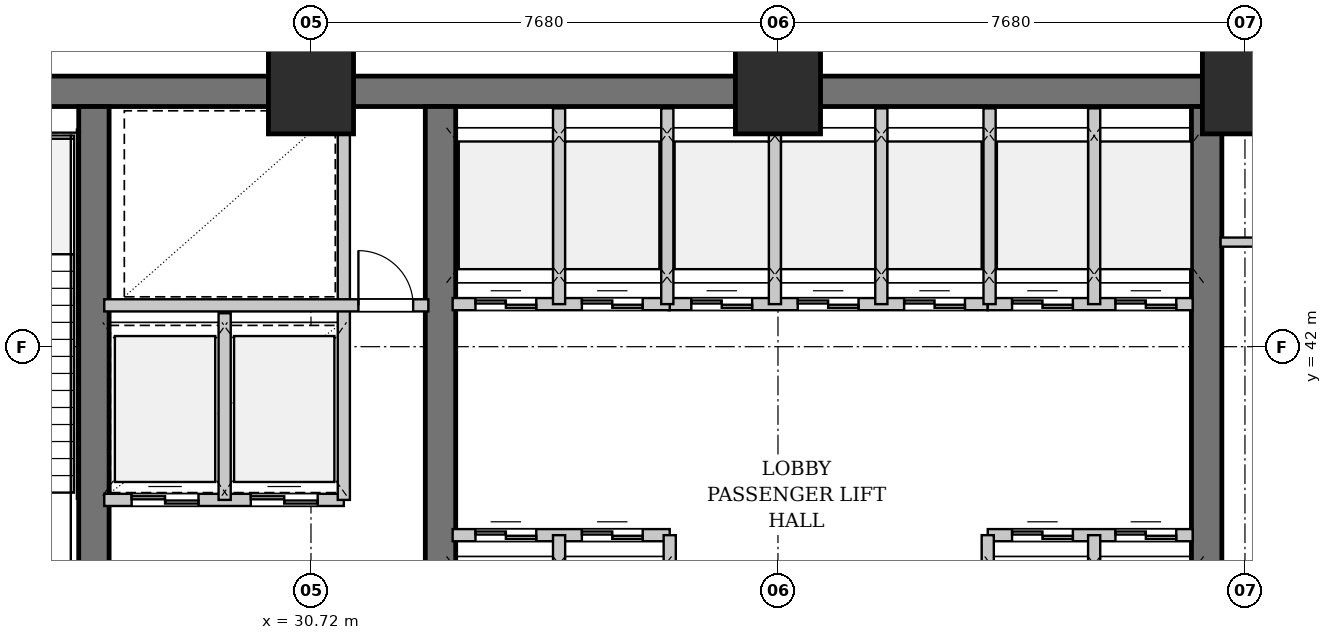
"""IFC4 building model, lengths in metres.
Left out: names, types, materials, properties, quantities, classifications, styles, units other than length and angle.
Written with IfcOpenShell. Run it as: python <this file> out.ifc"""

import sys

from ifc_helpers import new_model, si_unit, direction, frame, frame_2d, origin, origin_2d, place, context, subcontext, project, spatial, rectangle, extrude, element, fill, save


model = new_model("IFC4")
c1 = context("Model", 3, precision=1e-05, world=origin(), true_north=direction((0.0, 1.0)))
c2 = subcontext(c1, "Body", "Model", "MODEL_VIEW")
j1 = project(units=[si_unit("LENGTHUNIT", "METRE"), si_unit("PLANEANGLEUNIT", "RADIAN")], contexts=[c1])
p1 = place(None, origin())
s1 = spatial("IfcSite", under=j1, at=p1, CompositionType="ELEMENT")
p2 = place(p1, origin())
s2 = spatial("IfcBuilding", under=s1, at=p2, CompositionType="ELEMENT")
p3 = place(p2, origin())
s3 = spatial("IfcBuildingStorey", under=s2, at=p3, CompositionType="ELEMENT", Elevation=0.0)
p4 = place(p3, frame((22.79, 46.2, 0.0), z_axis=(0.0, 0.0, 1.0), x_axis=(1.0, 0.0, 0.0)))
e1 = element("IfcWall", 1, at=p4, inside=s3, PredefinedType="SHEAR", context=c2, shape_type="SweptSolid", body=[
    extrude(rectangle(XDim=31.22, YDim=0.5, at=frame_2d((15.61, 0.0))), origin(), (0.0, 0.0, 1.0), 4.94),
])
p5 = place(p3, frame((27.15, 35.65, 0.0), z_axis=(0.0, 0.0, 1.0), x_axis=(0.0, 1.0, 0.0)))
e2 = element("IfcWall", 2, at=p5, inside=s3, PredefinedType="SHEAR", context=c2, shape_type="SweptSolid", body=[
    extrude(rectangle(XDim=10.3, YDim=0.5, at=frame_2d((5.15, 0.0))), origin(), (0.0, 0.0, 1.0), 4.94),
])
p6 = place(p5, frame((0.65, 0.0, 0.0)))
e3 = element("IfcOpeningElement", 3, at=p6, cuts=e2, PredefinedType="OPENING", context=c2, shape_type="SweptSolid", body=[
    extrude(rectangle(XDim=1.1, YDim=2.15, at=frame_2d((0.55, 1.075))), frame((0.0, 0.26, 0.0), z_axis=(0.0, -1.0, 0.0), x_axis=(1.0, 0.0, 0.0)), (0.0, 0.0, 1.0), 0.52),
])
for number, where, z_axis, x_axis in (
    (4, (32.85, 35.65, 0.0), (0.0, 0.0, 1.0), (0.0, 1.0, 0.0)),
    (5, (45.45, 35.65, 0.0), (0.0, 0.0, 1.0), (0.0, 1.0, 0.0)),
):
    element("IfcWall", number, at=place(p3, frame(where, z_axis=z_axis, x_axis=x_axis)), inside=s3, PredefinedType="SHEAR", context=c2, shape_type="SweptSolid", body=[
        extrude(rectangle(XDim=10.3, YDim=0.5, at=frame_2d((5.15, 0.0))), origin(), (0.0, 0.0, 1.0), 4.94),
    ])
for number, where, z_axis, x_axis in (
    (6, (30.72, 46.2, 0.0), (0.0, 0.0, 1.0), (1.0, 0.0, 0.0)),
    (7, (38.4, 46.2, 0.0), (0.0, 0.0, 1.0), (1.0, 0.0, 0.0)),
    (8, (46.08, 46.2, 0.0), (0.0, 0.0, 1.0), (1.0, 0.0, 0.0)),
):
    element("IfcColumn", number, at=place(p3, frame(where, z_axis=z_axis, x_axis=x_axis)), inside=s3, PredefinedType="COLUMN", context=c2, shape_type="SweptSolid", body=[
        extrude(rectangle(XDim=1.4, YDim=1.4, at=origin_2d()), origin(), (0.0, 0.0, 1.0), 5.2),
    ])
p7 = place(p3, frame((27.32, 39.48, 0.0), z_axis=(0.0, 0.0, 1.0), x_axis=(1.0, 0.0, 0.0)))
e9 = element("IfcWall", 9, at=p7, inside=s3, PredefinedType="PARTITIONING", context=c2, shape_type="SweptSolid", body=[
    extrude(rectangle(XDim=3.94, YDim=0.2, at=frame_2d((1.97, 0.0))), origin(), (0.0, 0.0, 1.0), 4.94),
])
p8 = place(p7, frame((0.45, 0.0, 0.0)))
e10 = element("IfcOpeningElement", 10, at=p8, cuts=e9, PredefinedType="OPENING", context=c2, shape_type="SweptSolid", body=[
    extrude(rectangle(XDim=1.1, YDim=2.2, at=frame_2d((0.55, 1.1))), frame((0.0, 0.11, 0.0), z_axis=(0.0, -1.0, 0.0), x_axis=(1.0, 0.0, 0.0)), (0.0, 0.0, 1.0), 0.22),
])
p9 = place(p7, frame((2.41, 0.0, 0.0)))
e11 = element("IfcOpeningElement", 11, at=p9, cuts=e9, PredefinedType="OPENING", context=c2, shape_type="SweptSolid", body=[
    extrude(rectangle(XDim=1.1, YDim=2.2, at=frame_2d((0.55, 1.1))), frame((0.0, 0.11, 0.0), z_axis=(0.0, -1.0, 0.0), x_axis=(1.0, 0.0, 0.0)), (0.0, 0.0, 1.0), 0.22),
])
p10 = place(p3, frame((29.3, 39.48, 0.0), z_axis=(0.0, 0.0, 1.0), x_axis=(0.0, 1.0, 0.0)))
e12 = element("IfcWall", 12, at=p10, inside=s3, PredefinedType="PARTITIONING", context=c2, shape_type="SweptSolid", body=[
    extrude(rectangle(XDim=3.07, YDim=0.2, at=frame_2d((1.535, 0.0))), origin(), (0.0, 0.0, 1.0), 4.94),
])
p11 = place(p3, frame((31.26, 39.48, 0.0), z_axis=(0.0, 0.0, 1.0), x_axis=(0.0, 1.0, 0.0)))
e13 = element("IfcWall", 13, at=p11, inside=s3, PredefinedType="PARTITIONING", context=c2, shape_type="SweptSolid", body=[
    extrude(rectangle(XDim=6.44, YDim=0.2, at=frame_2d((3.22, 0.0))), origin(), (0.0, 0.0, 1.0), 4.94),
])
p12 = place(p3, frame((27.32, 42.68, 0.0), z_axis=(0.0, 0.0, 1.0), x_axis=(1.0, 0.0, 0.0)))
e14 = element("IfcWall", 14, at=p12, inside=s3, PredefinedType="PARTITIONING", context=c2, shape_type="SweptSolid", body=[
    extrude(rectangle(XDim=5.33, YDim=0.2, at=frame_2d((2.665, 0.0))), origin(), (0.0, 0.0, 1.0), 4.94),
])
p13 = place(p12, frame((4.18, 0.0, 0.0)))
e15 = element("IfcOpeningElement", 15, at=p13, cuts=e14, PredefinedType="OPENING", context=c2, shape_type="SweptSolid", body=[
    extrude(rectangle(XDim=0.9, YDim=2.15, at=frame_2d((0.45, 1.075))), frame((0.0, 0.11, 0.0), z_axis=(0.0, -1.0, 0.0), x_axis=(1.0, 0.0, 0.0)), (0.0, 0.0, 1.0), 0.22),
])
p14 = place(p3, frame((36.6, 42.7, 0.0), z_axis=(0.0, 0.0, 1.0), x_axis=(1.0, 0.0, 0.0)))
e16 = element("IfcWall", 16, at=p14, inside=s3, PredefinedType="PARTITIONING", context=c2, shape_type="SweptSolid", body=[
    extrude(rectangle(XDim=5.25, YDim=0.2, at=frame_2d((2.625, 0.0))), origin(), (0.0, 0.0, 1.0), 4.94),
])
p15 = place(p14, frame((0.375, 0.0, 0.0)))
e17 = element("IfcOpeningElement", 17, at=p15, cuts=e16, PredefinedType="OPENING", context=c2, shape_type="SweptSolid", body=[
    extrude(rectangle(XDim=1.0, YDim=2.2, at=frame_2d((0.5, 1.1))), frame((0.0, 0.11, 0.0), z_axis=(0.0, -1.0, 0.0), x_axis=(1.0, 0.0, 0.0)), (0.0, 0.0, 1.0), 0.22),
])
p16 = place(p14, frame((2.125, 0.0, 0.0)))
e18 = element("IfcOpeningElement", 18, at=p16, cuts=e16, PredefinedType="OPENING", context=c2, shape_type="SweptSolid", body=[
    extrude(rectangle(XDim=1.0, YDim=2.2, at=frame_2d((0.5, 1.1))), frame((0.0, 0.11, 0.0), z_axis=(0.0, -1.0, 0.0), x_axis=(1.0, 0.0, 0.0)), (0.0, 0.0, 1.0), 0.22),
])
p17 = place(p14, frame((3.875, 0.0, 0.0)))
e19 = element("IfcOpeningElement", 19, at=p17, cuts=e16, PredefinedType="OPENING", context=c2, shape_type="SweptSolid", body=[
    extrude(rectangle(XDim=1.0, YDim=2.2, at=frame_2d((0.5, 1.1))), frame((0.0, 0.11, 0.0), z_axis=(0.0, -1.0, 0.0), x_axis=(1.0, 0.0, 0.0)), (0.0, 0.0, 1.0), 0.22),
])
p18 = place(p3, frame((38.35, 42.7, 0.0), z_axis=(0.0, 0.0, 1.0), x_axis=(0.0, 1.0, 0.0)))
e20 = element("IfcWall", 20, at=p18, inside=s3, PredefinedType="PARTITIONING", context=c2, shape_type="SweptSolid", body=[
    extrude(rectangle(XDim=3.22, YDim=0.2, at=frame_2d((1.61, 0.0))), origin(), (0.0, 0.0, 1.0), 3.935),
])
p19 = place(p3, frame((40.1, 42.7, 0.0), z_axis=(0.0, 0.0, 1.0), x_axis=(0.0, 1.0, 0.0)))
e21 = element("IfcWall", 21, at=p19, inside=s3, PredefinedType="PARTITIONING", context=c2, shape_type="SweptSolid", body=[
    extrude(rectangle(XDim=3.22, YDim=0.2, at=frame_2d((1.61, 0.0))), origin(), (0.0, 0.0, 1.0), 4.94),
])
p20 = place(p3, frame((33.05, 38.9, 0.0), z_axis=(0.0, 0.0, 1.0), x_axis=(1.0, 0.0, 0.0)))
e22 = element("IfcWall", 22, at=p20, inside=s3, PredefinedType="PARTITIONING", context=c2, shape_type="SweptSolid", body=[
    extrude(rectangle(XDim=3.57, YDim=0.2, at=frame_2d((1.785, 0.0))), origin(), (0.0, 0.0, 1.0), 4.94),
])
p21 = place(p20, frame((0.375, 0.0, 0.0)))
e23 = element("IfcOpeningElement", 23, at=p21, cuts=e22, PredefinedType="OPENING", context=c2, shape_type="SweptSolid", body=[
    extrude(rectangle(XDim=1.0, YDim=2.2, at=frame_2d((0.5, 1.1))), frame((0.0, 0.11, 0.0), z_axis=(0.0, -1.0, 0.0), x_axis=(1.0, 0.0, 0.0)), (0.0, 0.0, 1.0), 0.22),
])
p22 = place(p20, frame((2.125, 0.0, 0.0)))
e24 = element("IfcOpeningElement", 24, at=p22, cuts=e22, PredefinedType="OPENING", context=c2, shape_type="SweptSolid", body=[
    extrude(rectangle(XDim=1.0, YDim=2.2, at=frame_2d((0.5, 1.1))), frame((0.0, 0.11, 0.0), z_axis=(0.0, -1.0, 0.0), x_axis=(1.0, 0.0, 0.0)), (0.0, 0.0, 1.0), 0.22),
])
p23 = place(p3, frame((33.05, 42.7, 0.0), z_axis=(0.0, 0.0, 1.0), x_axis=(1.0, 0.0, 0.0)))
e25 = element("IfcWall", 25, at=p23, inside=s3, PredefinedType="PARTITIONING", context=c2, shape_type="SweptSolid", body=[
    extrude(rectangle(XDim=3.57, YDim=0.2, at=frame_2d((1.785, 0.0))), origin(), (0.0, 0.0, 1.0), 4.94),
])
p24 = place(p23, frame((0.375, 0.0, 0.0)))
e26 = element("IfcOpeningElement", 26, at=p24, cuts=e25, PredefinedType="OPENING", context=c2, shape_type="SweptSolid", body=[
    extrude(rectangle(XDim=1.0, YDim=2.2, at=frame_2d((0.5, 1.1))), frame((0.0, 0.11, 0.0), z_axis=(0.0, -1.0, 0.0), x_axis=(1.0, 0.0, 0.0)), (0.0, 0.0, 1.0), 0.22),
])
p25 = place(p23, frame((2.125, 0.0, 0.0)))
e27 = element("IfcOpeningElement", 27, at=p25, cuts=e25, PredefinedType="OPENING", context=c2, shape_type="SweptSolid", body=[
    extrude(rectangle(XDim=1.0, YDim=2.2, at=frame_2d((0.5, 1.1))), frame((0.0, 0.11, 0.0), z_axis=(0.0, -1.0, 0.0), x_axis=(1.0, 0.0, 0.0)), (0.0, 0.0, 1.0), 0.22),
])
p26 = place(p3, frame((34.8, 35.65, 0.0), z_axis=(0.0, 0.0, 1.0), x_axis=(0.0, 1.0, 0.0)))
e28 = element("IfcWall", 28, at=p26, inside=s3, PredefinedType="PARTITIONING", context=c2, shape_type="SweptSolid", body=[
    extrude(rectangle(XDim=3.25, YDim=0.2, at=frame_2d((1.625, 0.0))), origin(), (0.0, 0.0, 1.0), 4.94),
])
p27 = place(p3, frame((34.8, 42.7, 0.0), z_axis=(0.0, 0.0, 1.0), x_axis=(0.0, 1.0, 0.0)))
e29 = element("IfcWall", 29, at=p27, inside=s3, PredefinedType="PARTITIONING", context=c2, shape_type="SweptSolid", body=[
    extrude(rectangle(XDim=3.22, YDim=0.2, at=frame_2d((1.61, 0.0))), origin(), (0.0, 0.0, 1.0), 4.94),
])
p28 = place(p3, frame((36.62, 35.5, 0.0), z_axis=(0.0, 0.0, 1.0), x_axis=(0.0, 1.0, 0.0)))
e30 = element("IfcWall", 30, at=p28, inside=s3, PredefinedType="PARTITIONING", context=c2, shape_type="SweptSolid", body=[
    extrude(rectangle(XDim=3.4, YDim=0.2, at=frame_2d((1.7, 0.0))), origin(), (0.0, 0.0, 1.0), 4.94),
])
p29 = place(p3, frame((36.58, 42.7, 0.0), z_axis=(0.0, 0.0, 1.0), x_axis=(0.0, 1.0, 0.0)))
e31 = element("IfcWall", 31, at=p29, inside=s3, PredefinedType="PARTITIONING", context=c2, shape_type="SweptSolid", body=[
    extrude(rectangle(XDim=3.22, YDim=0.2, at=frame_2d((1.61, 0.0))), origin(), (0.0, 0.0, 1.0), 4.94),
])
p30 = place(p3, frame((41.85, 38.9, 0.0), z_axis=(0.0, 0.0, 1.0), x_axis=(1.0, 0.0, 0.0)))
e32 = element("IfcWall", 32, at=p30, inside=s3, PredefinedType="PARTITIONING", context=c2, shape_type="SweptSolid", body=[
    extrude(rectangle(XDim=3.37, YDim=0.2, at=frame_2d((1.685, 0.0))), origin(), (0.0, 0.0, 1.0), 4.94),
])
p31 = place(p30, frame((0.4, 0.0, 0.0)))
e33 = element("IfcOpeningElement", 33, at=p31, cuts=e32, PredefinedType="OPENING", context=c2, shape_type="SweptSolid", body=[
    extrude(rectangle(XDim=1.0, YDim=2.2, at=frame_2d((0.5, 1.1))), frame((0.0, 0.11, 0.0), z_axis=(0.0, -1.0, 0.0), x_axis=(1.0, 0.0, 0.0)), (0.0, 0.0, 1.0), 0.22),
])
p32 = place(p30, frame((2.1, 0.0, 0.0)))
e34 = element("IfcOpeningElement", 34, at=p32, cuts=e32, PredefinedType="OPENING", context=c2, shape_type="SweptSolid", body=[
    extrude(rectangle(XDim=1.0, YDim=2.2, at=frame_2d((0.5, 1.1))), frame((0.0, 0.11, 0.0), z_axis=(0.0, -1.0, 0.0), x_axis=(1.0, 0.0, 0.0)), (0.0, 0.0, 1.0), 0.22),
])
p33 = place(p3, frame((41.85, 42.7, 0.0), z_axis=(0.0, 0.0, 1.0), x_axis=(1.0, 0.0, 0.0)))
e35 = element("IfcWall", 35, at=p33, inside=s3, PredefinedType="PARTITIONING", context=c2, shape_type="SweptSolid", body=[
    extrude(rectangle(XDim=3.37, YDim=0.2, at=frame_2d((1.685, 0.0))), origin(), (0.0, 0.0, 1.0), 4.94),
])
p34 = place(p33, frame((0.4, 0.0, 0.0)))
e36 = element("IfcOpeningElement", 36, at=p34, cuts=e35, PredefinedType="OPENING", context=c2, shape_type="SweptSolid", body=[
    extrude(rectangle(XDim=1.0, YDim=2.2, at=frame_2d((0.5, 1.1))), frame((0.0, 0.11, 0.0), z_axis=(0.0, -1.0, 0.0), x_axis=(1.0, 0.0, 0.0)), (0.0, 0.0, 1.0), 0.22),
])
p35 = place(p33, frame((2.1, 0.0, 0.0)))
e37 = element("IfcOpeningElement", 37, at=p35, cuts=e35, PredefinedType="OPENING", context=c2, shape_type="SweptSolid", body=[
    extrude(rectangle(XDim=1.0, YDim=2.2, at=frame_2d((0.5, 1.1))), frame((0.0, 0.11, 0.0), z_axis=(0.0, -1.0, 0.0), x_axis=(1.0, 0.0, 0.0)), (0.0, 0.0, 1.0), 0.22),
])
p36 = place(p3, frame((43.6, 35.65, 0.0), z_axis=(0.0, 0.0, 1.0), x_axis=(0.0, 1.0, 0.0)))
e38 = element("IfcWall", 38, at=p36, inside=s3, PredefinedType="PARTITIONING", context=c2, shape_type="SweptSolid", body=[
    extrude(rectangle(XDim=3.25, YDim=0.2, at=frame_2d((1.625, 0.0))), origin(), (0.0, 0.0, 1.0), 4.94),
])
p37 = place(p3, frame((43.6, 42.7, 0.0), z_axis=(0.0, 0.0, 1.0), x_axis=(0.0, 1.0, 0.0)))
e39 = element("IfcWall", 39, at=p37, inside=s3, PredefinedType="PARTITIONING", context=c2, shape_type="SweptSolid", body=[
    extrude(rectangle(XDim=3.22, YDim=0.2, at=frame_2d((1.61, 0.0))), origin(), (0.0, 0.0, 1.0), 4.94),
])
p38 = place(p3, frame((41.85, 35.5, 0.0), z_axis=(0.0, 0.0, 1.0), x_axis=(0.0, 1.0, 0.0)))
e40 = element("IfcWall", 40, at=p38, inside=s3, PredefinedType="PARTITIONING", context=c2, shape_type="SweptSolid", body=[
    extrude(rectangle(XDim=3.4, YDim=0.2, at=frame_2d((1.7, 0.0))), origin(), (0.0, 0.0, 1.0), 4.94),
])
p39 = place(p3, frame((41.88, 42.7, 0.0), z_axis=(0.0, 0.0, 1.0), x_axis=(0.0, 1.0, 0.0)))
e41 = element("IfcWall", 41, at=p39, inside=s3, PredefinedType="PARTITIONING", context=c2, shape_type="SweptSolid", body=[
    extrude(rectangle(XDim=3.22, YDim=0.2, at=frame_2d((1.61, 0.0))), origin(), (0.0, 0.0, 1.0), 4.94),
])
p40 = place(p3, frame((45.68, 43.72, 0.0), z_axis=(0.0, 0.0, 1.0), x_axis=(1.0, 0.0, 0.0)))
e42 = element("IfcWall", 42, at=p40, inside=s3, PredefinedType="PARTITIONING", context=c2, shape_type="SweptSolid", body=[
    extrude(rectangle(XDim=4.5, YDim=0.15, at=frame_2d((2.25, 0.0))), origin(), (0.0, 0.0, 1.0), 4.94),
])
p41 = place(p40, frame((0.55, 0.0, 0.0)))
e43 = element("IfcOpeningElement", 43, at=p41, cuts=e42, PredefinedType="OPENING", context=c2, shape_type="SweptSolid", body=[
    extrude(rectangle(XDim=0.95, YDim=2.15, at=frame_2d((0.475, 1.075))), frame((0.0, 0.085, 0.0), z_axis=(0.0, -1.0, 0.0), x_axis=(1.0, 0.0, 0.0)), (0.0, 0.0, 1.0), 0.17),
])
p42 = place(p8, origin())
e44 = element("IfcDoor", 44, at=p42, inside=s3, OperationType="DOUBLE_DOOR_SLIDING", PredefinedType="DOOR", context=c2, shape_type="SweptSolid", body=[
    extrude(rectangle(XDim=1.1, YDim=2.2, at=frame_2d((0.55, 1.1))), frame((0.0, 0.025, 0.0), z_axis=(0.0, -1.0, 0.0), x_axis=(1.0, 0.0, 0.0)), (0.0, 0.0, 1.0), 0.05),
])
fill(e10, e44)
p43 = place(p9, origin())
e45 = element("IfcDoor", 45, at=p43, inside=s3, OperationType="DOUBLE_DOOR_SLIDING", PredefinedType="DOOR", context=c2, shape_type="SweptSolid", body=[
    extrude(rectangle(XDim=1.1, YDim=2.2, at=frame_2d((0.55, 1.1))), frame((0.0, 0.025, 0.0), z_axis=(0.0, -1.0, 0.0), x_axis=(1.0, 0.0, 0.0)), (0.0, 0.0, 1.0), 0.05),
])
fill(e11, e45)
p44 = place(p13, origin())
e46 = element("IfcDoor", 46, at=p44, inside=s3, OperationType="SINGLE_SWING_LEFT", PredefinedType="DOOR", context=c2, shape_type="SweptSolid", body=[
    extrude(rectangle(XDim=0.9, YDim=2.15, at=frame_2d((0.45, 1.075))), frame((0.0, 0.025, 0.0), z_axis=(0.0, -1.0, 0.0), x_axis=(1.0, 0.0, 0.0)), (0.0, 0.0, 1.0), 0.05),
])
fill(e15, e46)
p45 = place(p15, origin())
e47 = element("IfcDoor", 47, at=p45, inside=s3, OperationType="DOUBLE_DOOR_SLIDING", PredefinedType="DOOR", context=c2, shape_type="SweptSolid", body=[
    extrude(rectangle(XDim=1.0, YDim=2.2, at=frame_2d((0.5, 1.1))), frame((0.0, 0.025, 0.0), z_axis=(0.0, -1.0, 0.0), x_axis=(1.0, 0.0, 0.0)), (0.0, 0.0, 1.0), 0.05),
])
fill(e17, e47)
p46 = place(p16, origin())
e48 = element("IfcDoor", 48, at=p46, inside=s3, OperationType="DOUBLE_DOOR_SLIDING", PredefinedType="DOOR", context=c2, shape_type="SweptSolid", body=[
    extrude(rectangle(XDim=1.0, YDim=2.2, at=frame_2d((0.5, 1.1))), frame((0.0, 0.025, 0.0), z_axis=(0.0, -1.0, 0.0), x_axis=(1.0, 0.0, 0.0)), (0.0, 0.0, 1.0), 0.05),
])
fill(e18, e48)
p47 = place(p17, origin())
e49 = element("IfcDoor", 49, at=p47, inside=s3, OperationType="DOUBLE_DOOR_SLIDING", PredefinedType="DOOR", context=c2, shape_type="SweptSolid", body=[
    extrude(rectangle(XDim=1.0, YDim=2.2, at=frame_2d((0.5, 1.1))), frame((0.0, 0.025, 0.0), z_axis=(0.0, -1.0, 0.0), x_axis=(1.0, 0.0, 0.0)), (0.0, 0.0, 1.0), 0.05),
])
fill(e19, e49)
p48 = place(p21, origin())
e50 = element("IfcDoor", 50, at=p48, inside=s3, OperationType="DOUBLE_DOOR_SLIDING", PredefinedType="DOOR", context=c2, shape_type="SweptSolid", body=[
    extrude(rectangle(XDim=1.0, YDim=2.2, at=frame_2d((0.5, 1.1))), frame((0.0, 0.025, 0.0), z_axis=(0.0, -1.0, 0.0), x_axis=(1.0, 0.0, 0.0)), (0.0, 0.0, 1.0), 0.05),
])
fill(e23, e50)
p49 = place(p22, origin())
e51 = element("IfcDoor", 51, at=p49, inside=s3, OperationType="DOUBLE_DOOR_SLIDING", PredefinedType="DOOR", context=c2, shape_type="SweptSolid", body=[
    extrude(rectangle(XDim=1.0, YDim=2.2, at=frame_2d((0.5, 1.1))), frame((0.0, 0.025, 0.0), z_axis=(0.0, -1.0, 0.0), x_axis=(1.0, 0.0, 0.0)), (0.0, 0.0, 1.0), 0.05),
])
fill(e24, e51)
p50 = place(p24, origin())
e52 = element("IfcDoor", 52, at=p50, inside=s3, OperationType="DOUBLE_DOOR_SLIDING", PredefinedType="DOOR", context=c2, shape_type="SweptSolid", body=[
    extrude(rectangle(XDim=1.0, YDim=2.2, at=frame_2d((0.5, 1.1))), frame((0.0, 0.025, 0.0), z_axis=(0.0, -1.0, 0.0), x_axis=(1.0, 0.0, 0.0)), (0.0, 0.0, 1.0), 0.05),
])
fill(e26, e52)
p51 = place(p25, origin())
e53 = element("IfcDoor", 53, at=p51, inside=s3, OperationType="DOUBLE_DOOR_SLIDING", PredefinedType="DOOR", context=c2, shape_type="SweptSolid", body=[
    extrude(rectangle(XDim=1.0, YDim=2.2, at=frame_2d((0.5, 1.1))), frame((0.0, 0.025, 0.0), z_axis=(0.0, -1.0, 0.0), x_axis=(1.0, 0.0, 0.0)), (0.0, 0.0, 1.0), 0.05),
])
fill(e27, e53)
p52 = place(p31, origin())
e54 = element("IfcDoor", 54, at=p52, inside=s3, OperationType="DOUBLE_DOOR_SLIDING", PredefinedType="DOOR", context=c2, shape_type="SweptSolid", body=[
    extrude(rectangle(XDim=1.0, YDim=2.2, at=frame_2d((0.5, 1.1))), frame((0.0, 0.025, 0.0), z_axis=(0.0, -1.0, 0.0), x_axis=(1.0, 0.0, 0.0)), (0.0, 0.0, 1.0), 0.05),
])
fill(e33, e54)
p53 = place(p32, origin())
e55 = element("IfcDoor", 55, at=p53, inside=s3, OperationType="DOUBLE_DOOR_SLIDING", PredefinedType="DOOR", context=c2, shape_type="SweptSolid", body=[
    extrude(rectangle(XDim=1.0, YDim=2.2, at=frame_2d((0.5, 1.1))), frame((0.0, 0.025, 0.0), z_axis=(0.0, -1.0, 0.0), x_axis=(1.0, 0.0, 0.0)), (0.0, 0.0, 1.0), 0.05),
])
fill(e34, e55)
p54 = place(p34, origin())
e56 = element("IfcDoor", 56, at=p54, inside=s3, OperationType="DOUBLE_DOOR_SLIDING", PredefinedType="DOOR", context=c2, shape_type="SweptSolid", body=[
    extrude(rectangle(XDim=1.0, YDim=2.2, at=frame_2d((0.5, 1.1))), frame((0.0, 0.025, 0.0), z_axis=(0.0, -1.0, 0.0), x_axis=(1.0, 0.0, 0.0)), (0.0, 0.0, 1.0), 0.05),
])
fill(e36, e56)
p55 = place(p35, origin())
e57 = element("IfcDoor", 57, at=p55, inside=s3, OperationType="DOUBLE_DOOR_SLIDING", PredefinedType="DOOR", context=c2, shape_type="SweptSolid", body=[
    extrude(rectangle(XDim=1.0, YDim=2.2, at=frame_2d((0.5, 1.1))), frame((0.0, 0.025, 0.0), z_axis=(0.0, -1.0, 0.0), x_axis=(1.0, 0.0, 0.0)), (0.0, 0.0, 1.0), 0.05),
])
fill(e37, e57)
save(model, sys.argv[1])
